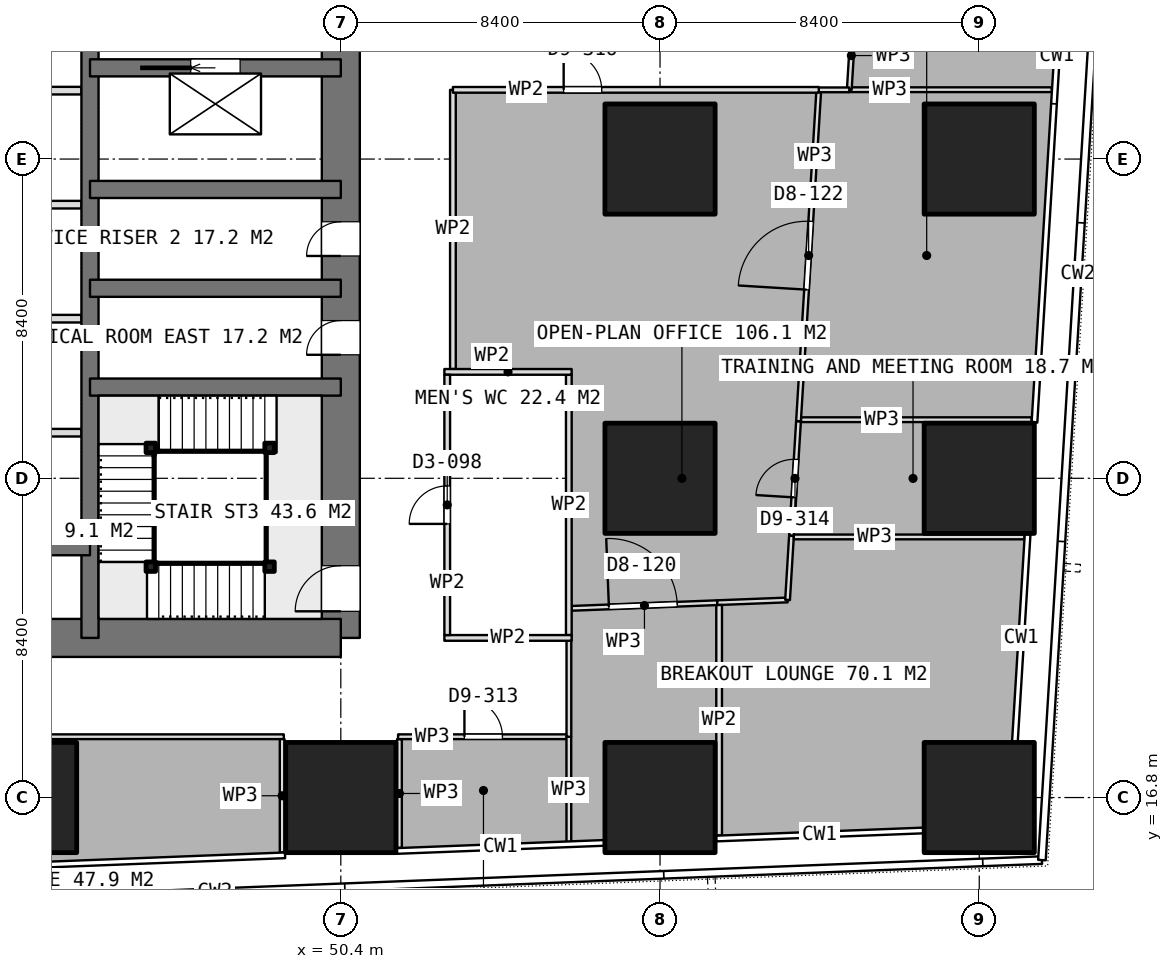
"""IFC4 building model, lengths in metres.
Left out: names, types, materials, properties, quantities, classifications, styles, units other than length and angle.
Written with IfcOpenShell. Run it as: python <this file> out.ifc"""

import sys

from ifc_helpers import new_model, si_unit, direction, frame, frame_2d, origin, origin_2d, place, context, subcontext, project, spatial, rectangle, extrude, element, fill, save


model = new_model("IFC4")
c1 = context("Model", 3, precision=1e-05, world=origin(), true_north=direction((0.0, 1.0)))
c2 = subcontext(c1, "Body", "Model", "MODEL_VIEW")
j1 = project(units=[si_unit("LENGTHUNIT", "METRE"), si_unit("PLANEANGLEUNIT", "RADIAN")], contexts=[c1])
p1 = place(None, origin())
s1 = spatial("IfcSite", under=j1, at=p1, CompositionType="ELEMENT")
p2 = place(p1, origin())
s2 = spatial("IfcBuilding", under=s1, at=p2, CompositionType="ELEMENT")
p3 = place(p2, frame((0.0, 0.0, 95.3)))
s3 = spatial("IfcBuildingStorey", under=s2, at=p3, CompositionType="ELEMENT", Elevation=95.3)
p4 = place(p3, frame((40.0, 21.0, 0.0), z_axis=(0.0, 0.0, 1.0), x_axis=(1.0, 0.0, 0.0)))
e1 = element("IfcWall", 1, at=p4, inside=s3, PredefinedType="SHEAR", context=c2, shape_type="SweptSolid", body=[
    extrude(rectangle(XDim=10.4, YDim=1.0, at=frame_2d((5.2, 0.0))), origin(), (0.0, 0.0, 1.0), 3.75),
])
p5 = place(p3, frame((50.4, 21.0, 0.0), z_axis=(0.0, 0.0, 1.0), x_axis=(0.0, 1.0, 0.0)))
e2 = element("IfcWall", 2, at=p5, inside=s3, PredefinedType="SHEAR", context=c2, shape_type="SweptSolid", body=[
    extrude(rectangle(XDim=25.2, YDim=1.0, at=frame_2d((12.6, 0.0))), origin(), (0.0, 0.0, 1.0), 3.75),
])
p6 = place(p5, frame((16.2, 0.0, 0.0)))
e3 = element("IfcOpeningElement", 3, at=p6, cuts=e2, PredefinedType="OPENING", context=c2, shape_type="SweptSolid", body=[
    extrude(rectangle(XDim=1.2, YDim=2.1, at=frame_2d((0.6, 1.05))), frame((0.0, 0.51, 0.0), z_axis=(0.0, -1.0, 0.0), x_axis=(1.0, 0.0, 0.0)), (0.0, 0.0, 1.0), 1.02),
])
p7 = place(p5, frame((10.05, 0.0, 0.0)))
e4 = element("IfcOpeningElement", 4, at=p7, cuts=e2, PredefinedType="OPENING", context=c2, shape_type="SweptSolid", body=[
    extrude(rectangle(XDim=0.9, YDim=2.1, at=frame_2d((0.45, 1.05))), frame((0.0, 0.51, 0.0), z_axis=(0.0, -1.0, 0.0), x_axis=(1.0, 0.0, 0.0)), (0.0, 0.0, 1.0), 1.02),
])
p8 = place(p5, frame((7.45, 0.0, 0.0)))
e5 = element("IfcOpeningElement", 5, at=p8, cuts=e2, PredefinedType="OPENING", context=c2, shape_type="SweptSolid", body=[
    extrude(rectangle(XDim=0.9, YDim=2.1, at=frame_2d((0.45, 1.05))), frame((0.0, 0.51, 0.0), z_axis=(0.0, -1.0, 0.0), x_axis=(1.0, 0.0, 0.0)), (0.0, 0.0, 1.0), 1.02),
])
p9 = place(p5, frame((0.7, 0.0, 0.0)))
e6 = element("IfcOpeningElement", 6, at=p9, cuts=e2, PredefinedType="OPENING", context=c2, shape_type="SweptSolid", body=[
    extrude(rectangle(XDim=1.2, YDim=2.1, at=frame_2d((0.6, 1.05))), frame((0.0, 0.51, 0.0), z_axis=(0.0, -1.0, 0.0), x_axis=(1.0, 0.0, 0.0)), (0.0, 0.0, 1.0), 1.02),
])
p10 = place(p3, frame((43.8, 21.0, 0.0), z_axis=(0.0, 0.0, 1.0), x_axis=(0.0, 1.0, 0.0)))
e7 = element("IfcWall", 7, at=p10, inside=s3, PredefinedType="SHEAR", context=c2, shape_type="SweptSolid", body=[
    extrude(rectangle(XDim=25.2, YDim=0.45, at=frame_2d((12.6, 0.0))), origin(), (0.0, 0.0, 1.0), 3.75),
])
p11 = place(p3, frame((40.0, 23.4, 0.0), z_axis=(0.0, 0.0, 1.0), x_axis=(1.0, 0.0, 0.0)))
e8 = element("IfcWall", 8, at=p11, inside=s3, PredefinedType="SHEAR", context=c2, shape_type="SweptSolid", body=[
    extrude(rectangle(XDim=3.8, YDim=0.45, at=frame_2d((1.9, 0.0))), origin(), (0.0, 0.0, 1.0), 3.75),
])
for number, where, z_axis, x_axis in (
    (9, (43.8, 27.6, 0.0), (0.0, 0.0, 1.0), (1.0, 0.0, 0.0)),
    (10, (43.8, 30.2, 0.0), (0.0, 0.0, 1.0), (1.0, 0.0, 0.0)),
    (11, (43.8, 32.8, 0.0), (0.0, 0.0, 1.0), (1.0, 0.0, 0.0)),
):
    element("IfcWall", number, at=place(p3, frame(where, z_axis=z_axis, x_axis=x_axis)), inside=s3, PredefinedType="SHEAR", context=c2, shape_type="SweptSolid", body=[
        extrude(rectangle(XDim=6.6, YDim=0.45, at=frame_2d((3.3, 0.0))), origin(), (0.0, 0.0, 1.0), 3.75),
    ])
p12 = place(p3, frame((43.8, 36.0, 0.0), z_axis=(0.0, 0.0, 1.0), x_axis=(1.0, 0.0, 0.0)))
e12 = element("IfcWall", 12, at=p12, inside=s3, PredefinedType="SHEAR", context=c2, shape_type="SweptSolid", body=[
    extrude(rectangle(XDim=6.6, YDim=0.45, at=frame_2d((3.3, 0.0))), origin(), (0.0, 0.0, 1.0), 3.75),
])
p13 = place(p12, frame((2.65, 0.0, 0.0)))
e13 = element("IfcOpeningElement", 13, at=p13, cuts=e12, PredefinedType="OPENING", context=c2, shape_type="SweptSolid", body=[
    extrude(rectangle(XDim=1.3, YDim=2.1, at=frame_2d((0.65, 1.05))), frame((0.0, 0.235, 0.0), z_axis=(0.0, -1.0, 0.0), x_axis=(1.0, 0.0, 0.0)), (0.0, 0.0, 1.0), 0.47),
])
for number, where, z_axis, x_axis in (
    (14, (42.0, 16.8, 0.0), (0.0, 0.0, 1.0), (1.0, 0.0, 0.0)),
    (15, (50.4, 16.8, 0.0), (0.0, 0.0, 1.0), (1.0, 0.0, 0.0)),
    (16, (58.8, 16.8, 0.0), (0.0, 0.0, 1.0), (1.0, 0.0, 0.0)),
    (17, (58.8, 25.2, 0.0), (0.0, 0.0, 1.0), (1.0, 0.0, 0.0)),
    (18, (58.8, 33.6, 0.0), (0.0, 0.0, 1.0), (1.0, 0.0, 0.0)),
    (19, (67.2, 16.8, 0.0), (0.0, 0.0, 1.0), (1.0, 0.0, 0.0)),
    (20, (67.2, 25.2, 0.0), (0.0, 0.0, 1.0), (1.0, 0.0, 0.0)),
    (21, (67.2, 33.6, 0.0), (0.0, 0.0, 1.0), (1.0, 0.0, 0.0)),
):
    element("IfcColumn", number, at=place(p3, frame(where, z_axis=z_axis, x_axis=x_axis)), inside=s3, PredefinedType="COLUMN", context=c2, shape_type="SweptSolid", body=[
        extrude(rectangle(XDim=2.9, YDim=2.9, at=origin_2d()), origin(), (0.0, 0.0, 1.0), 3.75),
    ])
for number, where, z_axis, x_axis in (
    (22, (40.5, 26.4, 0.0), (0.0, 0.0, 1.0), (1.0, 0.0, 0.0)),
    (23, (40.5, 29.4, 0.0), (0.0, 0.0, 1.0), (1.0, 0.0, 0.0)),
    (24, (40.5, 32.4, 0.0), (0.0, 0.0, 1.0), (1.0, 0.0, 0.0)),
    (25, (40.5, 35.4, 0.0), (0.0, 0.0, 1.0), (1.0, 0.0, 0.0)),
):
    element("IfcWall", number, at=place(p3, frame(where, z_axis=z_axis, x_axis=x_axis)), inside=s3, PredefinedType="PARTITIONING", context=c2, shape_type="SweptSolid", body=[
        extrude(rectangle(XDim=3.075, YDim=0.2, at=frame_2d((1.538, 0.0))), origin(), (0.0, 0.0, 1.0), 3.5),
    ])
for number, where, z_axis, x_axis in (
    (26, (53.125, 21.0, 0.0), (0.0, 0.0, 1.0), (1.0, 0.0, 0.0)),
    (27, (53.125, 28.0, 0.0), (0.0, 0.0, 1.0), (1.0, 0.0, 0.0)),
):
    element("IfcWall", number, at=place(p3, frame(where, z_axis=z_axis, x_axis=x_axis)), inside=s3, PredefinedType="PARTITIONING", context=c2, shape_type="SweptSolid", body=[
        extrude(rectangle(XDim=3.35, YDim=0.15, at=frame_2d((1.675, 0.0))), origin(), (0.0, 0.0, 1.0), 3.5),
    ])
p14 = place(p3, frame((53.2, 21.075, 0.0), z_axis=(0.0, 0.0, 1.0), x_axis=(0.0, 1.0, 0.0)))
e28 = element("IfcWall", 28, at=p14, inside=s3, PredefinedType="PARTITIONING", context=c2, shape_type="SweptSolid", body=[
    extrude(rectangle(XDim=6.85, YDim=0.15, at=frame_2d((3.425, 0.0))), origin(), (0.0, 0.0, 1.0), 3.5),
])
p15 = place(p14, frame((2.925, 0.0, 0.0)))
e29 = element("IfcOpeningElement", 29, at=p15, cuts=e28, PredefinedType="OPENING", context=c2, shape_type="SweptSolid", body=[
    extrude(rectangle(XDim=1.0, YDim=2.1, at=frame_2d((0.5, 1.05))), frame((0.0, 0.085, 0.0), z_axis=(0.0, -1.0, 0.0), x_axis=(1.0, 0.0, 0.0)), (0.0, 0.0, 1.0), 0.17),
])
p16 = place(p3, frame((56.4, 21.075, 0.0), z_axis=(0.0, 0.0, 1.0), x_axis=(0.0, 1.0, 0.0)))
e30 = element("IfcWall", 30, at=p16, inside=s3, PredefinedType="PARTITIONING", context=c2, shape_type="SweptSolid", body=[
    extrude(rectangle(XDim=6.85, YDim=0.15, at=frame_2d((3.425, 0.0))), origin(), (0.0, 0.0, 1.0), 3.5),
])
p17 = place(p3, frame((69.11, 35.425, 0.0), z_axis=(0.0, 0.0, 1.0), x_axis=(-1.0, 0.0, 0.0)))
e31 = element("IfcWall", 31, at=p17, inside=s3, PredefinedType="PARTITIONING", context=c2, shape_type="SweptSolid", body=[
    extrude(rectangle(XDim=5.33, YDim=0.125, at=frame_2d((2.665, 0.0))), origin(), (0.0, 0.0, 1.0), 3.5),
])
p18 = place(p3, frame((63.78, 35.425, 0.0), z_axis=(0.0, 0.0, 1.0), x_axis=(0.06106040412, 0.998134072682, 0.0)))
e32 = element("IfcWall", 32, at=p18, inside=s3, PredefinedType="PARTITIONING", context=c2, shape_type="SweptSolid", body=[
    extrude(rectangle(XDim=1.799, YDim=0.125, at=frame_2d((0.9, 0.0))), origin(), (0.0, 0.0, 1.0), 3.5),
])
p19 = place(p3, frame((51.943, 15.477, 0.0), z_axis=(0.0, 0.0, 1.0), x_axis=(0.0, 1.0, 0.0)))
e33 = element("IfcWall", 33, at=p19, inside=s3, PredefinedType="PARTITIONING", context=c2, shape_type="SweptSolid", body=[
    extrude(rectangle(XDim=2.86, YDim=0.125, at=frame_2d((1.43, 0.0))), origin(), (0.0, 0.0, 1.0), 3.5),
])
p20 = place(p3, frame((51.907, 18.4, 0.0), z_axis=(0.0, 0.0, 1.0), x_axis=(1.0, 0.0, 0.0)))
e34 = element("IfcWall", 34, at=p20, inside=s3, PredefinedType="PARTITIONING", context=c2, shape_type="SweptSolid", body=[
    extrude(rectangle(XDim=4.493, YDim=0.125, at=frame_2d((2.247, 0.0))), origin(), (0.0, 0.0, 1.0), 3.5),
])
p21 = place(p20, frame((1.746, 0.0, 0.0)))
e35 = element("IfcOpeningElement", 35, at=p21, cuts=e34, PredefinedType="OPENING", context=c2, shape_type="SweptSolid", body=[
    extrude(rectangle(XDim=1.0, YDim=2.1, at=frame_2d((0.5, 1.05))), frame((0.0, 0.073, 0.0), z_axis=(0.0, -1.0, 0.0), x_axis=(1.0, 0.0, 0.0)), (0.0, 0.0, 1.0), 0.145),
])
p22 = place(p3, frame((56.4, 18.4, 0.0), z_axis=(0.0, 0.0, 1.0), x_axis=(0.000351308603, -0.999999938291, 0.0)))
e36 = element("IfcWall", 36, at=p22, inside=s3, PredefinedType="PARTITIONING", context=c2, shape_type="SweptSolid", body=[
    extrude(rectangle(XDim=2.78, YDim=0.125, at=frame_2d((1.39, 0.0))), origin(), (0.0, 0.0, 1.0), 3.5),
])
p23 = place(p3, frame((56.402, 18.4, 0.0), z_axis=(0.0, 0.0, 1.0), x_axis=(0.0, 1.0, 0.0)))
e37 = element("IfcWall", 37, at=p23, inside=s3, PredefinedType="PARTITIONING", context=c2, shape_type="SweptSolid", body=[
    extrude(rectangle(XDim=2.675, YDim=0.125, at=frame_2d((1.337, 0.0))), origin(), (0.0, 0.0, 1.0), 3.5),
])
p24 = place(p3, frame((56.475, 21.778, 0.0), z_axis=(0.0, 0.0, 1.0), x_axis=(0.999244807444, 0.038856335344, 0.0)))
e38 = element("IfcWall", 38, at=p24, inside=s3, PredefinedType="PARTITIONING", context=c2, shape_type="SweptSolid", body=[
    extrude(rectangle(XDim=3.833, YDim=0.125, at=frame_2d((1.917, 0.0))), origin(), (0.0, 0.0, 1.0), 3.5),
])
p25 = place(p24, frame((0.98, 0.0, 0.0)))
e39 = element("IfcOpeningElement", 39, at=p25, cuts=e38, PredefinedType="OPENING", context=c2, shape_type="SweptSolid", body=[
    extrude(rectangle(XDim=1.8, YDim=2.1, at=frame_2d((0.9, 1.05))), frame((0.0, 0.073, 0.0), z_axis=(0.0, -1.0, 0.0), x_axis=(1.0, 0.0, 0.0)), (0.0, 0.0, 1.0), 0.145),
])
p26 = place(p3, frame((60.305, 21.927, 0.0), z_axis=(0.0, 0.0, 1.0), x_axis=(0.999243944403, 0.038878523292, 0.0)))
e40 = element("IfcWall", 40, at=p26, inside=s3, PredefinedType="PARTITIONING", context=c2, shape_type="SweptSolid", body=[
    extrude(rectangle(XDim=1.853, YDim=0.125, at=frame_2d((0.926, 0.0))), origin(), (0.0, 0.0, 1.0), 3.5),
])
p27 = place(p3, frame((62.156, 21.999, 0.0), z_axis=(0.0, 0.0, 1.0), x_axis=(0.060782070361, 0.998151060673, 0.0)))
e41 = element("IfcWall", 41, at=p27, inside=s3, PredefinedType="PARTITIONING", context=c2, shape_type="SweptSolid", body=[
    extrude(rectangle(XDim=1.695, YDim=0.125, at=frame_2d((0.848, 0.0))), origin(), (0.0, 0.0, 1.0), 3.5),
])
p28 = place(p3, frame((62.32, 23.657, 0.0), z_axis=(0.0, 0.0, 1.0), x_axis=(1.0, 0.0, 0.0)))
e42 = element("IfcWall", 42, at=p28, inside=s3, PredefinedType="PARTITIONING", context=c2, shape_type="SweptSolid", body=[
    extrude(rectangle(XDim=6.069, YDim=0.125, at=frame_2d((3.034, 0.0))), origin(), (0.0, 0.0, 1.0), 3.5),
])
p29 = place(p3, frame((62.259, 23.692, 0.0), z_axis=(0.0, 0.0, 1.0), x_axis=(0.061365192518, 0.998115380679, 0.0)))
e43 = element("IfcWall", 43, at=p29, inside=s3, PredefinedType="PARTITIONING", context=c2, shape_type="SweptSolid", body=[
    extrude(rectangle(XDim=3.016, YDim=0.125, at=frame_2d((1.508, 0.0))), origin(), (0.0, 0.0, 1.0), 3.5),
])
p30 = place(p29, frame((1.008, 0.0, 0.0)))
e44 = element("IfcOpeningElement", 44, at=p30, cuts=e43, PredefinedType="OPENING", context=c2, shape_type="SweptSolid", body=[
    extrude(rectangle(XDim=1.0, YDim=2.1, at=frame_2d((0.5, 1.05))), frame((0.0, 0.073, 0.0), z_axis=(0.0, -1.0, 0.0), x_axis=(1.0, 0.0, 0.0)), (0.0, 0.0, 1.0), 0.145),
])
p31 = place(p3, frame((62.509, 26.742, 0.0), z_axis=(0.0, 0.0, 1.0), x_axis=(1.0, 0.0, 0.0)))
e45 = element("IfcWall", 45, at=p31, inside=s3, PredefinedType="PARTITIONING", context=c2, shape_type="SweptSolid", body=[
    extrude(rectangle(XDim=6.069, YDim=0.125, at=frame_2d((3.034, 0.0))), origin(), (0.0, 0.0, 1.0), 3.5),
])
p32 = place(p3, frame((62.444, 26.703, 0.0), z_axis=(0.0, 0.0, 1.0), x_axis=(0.061130522571, 0.998129780745, 0.0)))
e46 = element("IfcWall", 46, at=p32, inside=s3, PredefinedType="PARTITIONING", context=c2, shape_type="SweptSolid", body=[
    extrude(rectangle(XDim=8.734, YDim=0.125, at=frame_2d((4.367, 0.0))), origin(), (0.0, 0.0, 1.0), 3.5),
])
p33 = place(p32, frame((3.467, 0.0, 0.0)))
e47 = element("IfcOpeningElement", 47, at=p33, cuts=e46, PredefinedType="OPENING", context=c2, shape_type="SweptSolid", body=[
    extrude(rectangle(XDim=1.8, YDim=2.1, at=frame_2d((0.9, 1.05))), frame((0.0, 0.073, 0.0), z_axis=(0.0, -1.0, 0.0), x_axis=(1.0, 0.0, 0.0)), (0.0, 0.0, 1.0), 0.145),
])
p34 = place(p3, frame((62.978, 35.421, 0.0), z_axis=(0.0, 0.0, 1.0), x_axis=(1.0, 0.0, 0.0)))
e48 = element("IfcWall", 48, at=p34, inside=s3, PredefinedType="PARTITIONING", context=c2, shape_type="SweptSolid", body=[
    extrude(rectangle(XDim=0.802, YDim=0.125, at=frame_2d((0.401, 0.0))), origin(), (0.0, 0.0, 1.0), 3.5),
])
p35 = place(p3, frame((33.826, 18.4, 0.0), z_axis=(0.0, 0.0, 1.0), x_axis=(1.0, 0.0, 0.0)))
e49 = element("IfcWall", 49, at=p35, inside=s3, PredefinedType="PARTITIONING", context=c2, shape_type="SweptSolid", body=[
    extrude(rectangle(XDim=15.074, YDim=0.125, at=frame_2d((7.537, 0.0))), origin(), (0.0, 0.0, 1.0), 3.5),
])
p36 = place(p35, frame((4.837, 0.0, 0.0)))
e50 = element("IfcOpeningElement", 50, at=p36, cuts=e49, PredefinedType="OPENING", context=c2, shape_type="SweptSolid", body=[
    extrude(rectangle(XDim=1.8, YDim=2.1, at=frame_2d((0.9, 1.05))), frame((0.0, 0.073, 0.0), z_axis=(0.0, -1.0, 0.0), x_axis=(1.0, 0.0, 0.0)), (0.0, 0.0, 1.0), 0.145),
])
p37 = place(p3, frame((48.857, 18.337, 0.0), z_axis=(0.0, 0.0, 1.0), x_axis=(0.0, -1.0, 0.0)))
e51 = element("IfcWall", 51, at=p37, inside=s3, PredefinedType="PARTITIONING", context=c2, shape_type="SweptSolid", body=[
    extrude(rectangle(XDim=2.98, YDim=0.125, at=frame_2d((1.49, 0.0))), origin(), (0.0, 0.0, 1.0), 3.5),
])
p38 = place(p3, frame((53.35, 28.075, 0.0), z_axis=(0.0, 0.0, 1.0), x_axis=(0.0, 1.0, 0.0)))
e52 = element("IfcWall", 52, at=p38, inside=s3, PredefinedType="PARTITIONING", context=c2, shape_type="SweptSolid", body=[
    extrude(rectangle(XDim=7.346, YDim=0.15, at=frame_2d((3.673, 0.0))), origin(), (0.0, 0.0, 1.0), 3.5),
])
p39 = place(p3, frame((53.35, 35.421, 0.0), z_axis=(0.0, 0.0, 1.0), x_axis=(1.0, 0.0, 0.0)))
e53 = element("IfcWall", 53, at=p39, inside=s3, PredefinedType="PARTITIONING", context=c2, shape_type="SweptSolid", body=[
    extrude(rectangle(XDim=9.628, YDim=0.15, at=frame_2d((4.814, 0.0))), origin(), (0.0, 0.0, 1.0), 3.5),
])
p40 = place(p39, frame((2.914, 0.0, 0.0)))
e54 = element("IfcOpeningElement", 54, at=p40, cuts=e53, PredefinedType="OPENING", context=c2, shape_type="SweptSolid", body=[
    extrude(rectangle(XDim=1.0, YDim=2.1, at=frame_2d((0.5, 1.05))), frame((0.0, 0.085, 0.0), z_axis=(0.0, -1.0, 0.0), x_axis=(1.0, 0.0, 0.0)), (0.0, 0.0, 1.0), 0.17),
])
p41 = place(p3, frame((60.355, 21.866, 0.0), z_axis=(0.0, 0.0, 1.0), x_axis=(0.0, -1.0, 0.0)))
e55 = element("IfcWall", 55, at=p41, inside=s3, PredefinedType="PARTITIONING", context=c2, shape_type="SweptSolid", body=[
    extrude(rectangle(XDim=6.062, YDim=0.15, at=frame_2d((3.031, 0.0))), origin(), (0.0, 0.0, 1.0), 3.5),
])
for number, where, z_axis, x_axis in (
    (56, (48.525, 22.875, 0.0), (0.0, 0.0, 1.0), (1.0, 0.0, 0.0)),
    (57, (45.4, 22.875, 0.0), (0.0, 0.0, 1.0), (1.0, 0.0, 0.0)),
    (58, (45.4, 26.0, 0.0), (0.0, 0.0, 1.0), (1.0, 0.0, 0.0)),
    (59, (48.525, 26.0, 0.0), (0.0, 0.0, 1.0), (1.0, 0.0, 0.0)),
):
    element("IfcColumn", number, at=place(p3, frame(where, z_axis=z_axis, x_axis=x_axis)), inside=s3, PredefinedType="COLUMN", context=c2, shape_type="SweptSolid", body=[
        extrude(rectangle(XDim=0.25, YDim=0.25, at=origin_2d()), origin(), (0.0, 0.0, 1.0), 3.75),
    ])
p42 = place(p7, origin())
e60 = element("IfcDoor", 60, at=p42, inside=s3, OperationType="SINGLE_SWING_LEFT", PredefinedType="DOOR", context=c2, shape_type="SweptSolid", body=[
    extrude(rectangle(XDim=0.9, YDim=2.1, at=frame_2d((0.45, 1.05))), frame((0.0, 0.025, 0.0), z_axis=(0.0, -1.0, 0.0), x_axis=(1.0, 0.0, 0.0)), (0.0, 0.0, 1.0), 0.05),
])
fill(e4, e60)
p43 = place(p8, origin())
e61 = element("IfcDoor", 61, at=p43, inside=s3, OperationType="SINGLE_SWING_LEFT", PredefinedType="DOOR", context=c2, shape_type="SweptSolid", body=[
    extrude(rectangle(XDim=0.9, YDim=2.1, at=frame_2d((0.45, 1.05))), frame((0.0, 0.025, 0.0), z_axis=(0.0, -1.0, 0.0), x_axis=(1.0, 0.0, 0.0)), (0.0, 0.0, 1.0), 0.05),
])
fill(e5, e61)
p44 = place(p13, origin())
e62 = element("IfcDoor", 62, at=p44, inside=s3, OperationType="SLIDING_TO_LEFT", PredefinedType="USERDEFINED", context=c2, shape_type="SweptSolid", body=[
    extrude(rectangle(XDim=1.3, YDim=2.1, at=frame_2d((0.65, 1.05))), frame((0.0, 0.025, 0.0), z_axis=(0.0, -1.0, 0.0), x_axis=(1.0, 0.0, 0.0)), (0.0, 0.0, 1.0), 0.05),
])
fill(e13, e62)
p45 = place(p15, origin())
e63 = element("IfcDoor", 63, at=p45, inside=s3, OperationType="SINGLE_SWING_LEFT", PredefinedType="DOOR", context=c2, shape_type="SweptSolid", body=[
    extrude(rectangle(XDim=1.0, YDim=2.1, at=frame_2d((0.5, 1.05))), frame((0.0, 0.025, 0.0), z_axis=(0.0, -1.0, 0.0), x_axis=(1.0, 0.0, 0.0)), (0.0, 0.0, 1.0), 0.05),
])
fill(e29, e63)
p46 = place(p21, origin())
e64 = element("IfcDoor", 64, at=p46, inside=s3, OperationType="SINGLE_SWING_LEFT", PredefinedType="DOOR", context=c2, shape_type="SweptSolid", body=[
    extrude(rectangle(XDim=1.0, YDim=2.1, at=frame_2d((0.5, 1.05))), frame((0.0, 0.025, 0.0), z_axis=(0.0, -1.0, 0.0), x_axis=(1.0, 0.0, 0.0)), (0.0, 0.0, 1.0), 0.05),
])
fill(e35, e64)
p47 = place(p25, origin())
e65 = element("IfcDoor", 65, at=p47, inside=s3, OperationType="DOUBLE_DOOR_SINGLE_SWING", PredefinedType="DOOR", context=c2, shape_type="SweptSolid", body=[
    extrude(rectangle(XDim=1.8, YDim=2.1, at=frame_2d((0.9, 1.05))), frame((0.0, 0.025, 0.0), z_axis=(0.0, -1.0, 0.0), x_axis=(1.0, 0.0, 0.0)), (0.0, 0.0, 1.0), 0.05),
])
fill(e39, e65)
p48 = place(p30, origin())
e66 = element("IfcDoor", 66, at=p48, inside=s3, OperationType="SINGLE_SWING_LEFT", PredefinedType="DOOR", context=c2, shape_type="SweptSolid", body=[
    extrude(rectangle(XDim=1.0, YDim=2.1, at=frame_2d((0.5, 1.05))), frame((0.0, 0.025, 0.0), z_axis=(0.0, -1.0, 0.0), x_axis=(1.0, 0.0, 0.0)), (0.0, 0.0, 1.0), 0.05),
])
fill(e44, e66)
p49 = place(p33, origin())
e67 = element("IfcDoor", 67, at=p49, inside=s3, OperationType="DOUBLE_DOOR_SINGLE_SWING", PredefinedType="DOOR", context=c2, shape_type="SweptSolid", body=[
    extrude(rectangle(XDim=1.8, YDim=2.1, at=frame_2d((0.9, 1.05))), frame((0.0, 0.025, 0.0), z_axis=(0.0, -1.0, 0.0), x_axis=(1.0, 0.0, 0.0)), (0.0, 0.0, 1.0), 0.05),
])
fill(e47, e67)
p50 = place(p40, origin())
e68 = element("IfcDoor", 68, at=p50, inside=s3, OperationType="SINGLE_SWING_LEFT", PredefinedType="DOOR", context=c2, shape_type="SweptSolid", body=[
    extrude(rectangle(XDim=1.0, YDim=2.1, at=frame_2d((0.5, 1.05))), frame((0.0, 0.025, 0.0), z_axis=(0.0, -1.0, 0.0), x_axis=(1.0, 0.0, 0.0)), (0.0, 0.0, 1.0), 0.05),
])
fill(e54, e68)
p51 = place(p9, origin())
e69 = element("IfcDoor", 69, at=p51, inside=s3, OperationType="SINGLE_SWING_RIGHT", PredefinedType="DOOR", context=c2, shape_type="SweptSolid", body=[
    extrude(rectangle(XDim=1.2, YDim=2.1, at=frame_2d((0.6, 1.05))), frame((0.0, 0.025, 0.0), z_axis=(0.0, -1.0, 0.0), x_axis=(1.0, 0.0, 0.0)), (0.0, 0.0, 1.0), 0.05),
])
fill(e6, e69)
save(model, sys.argv[1])
